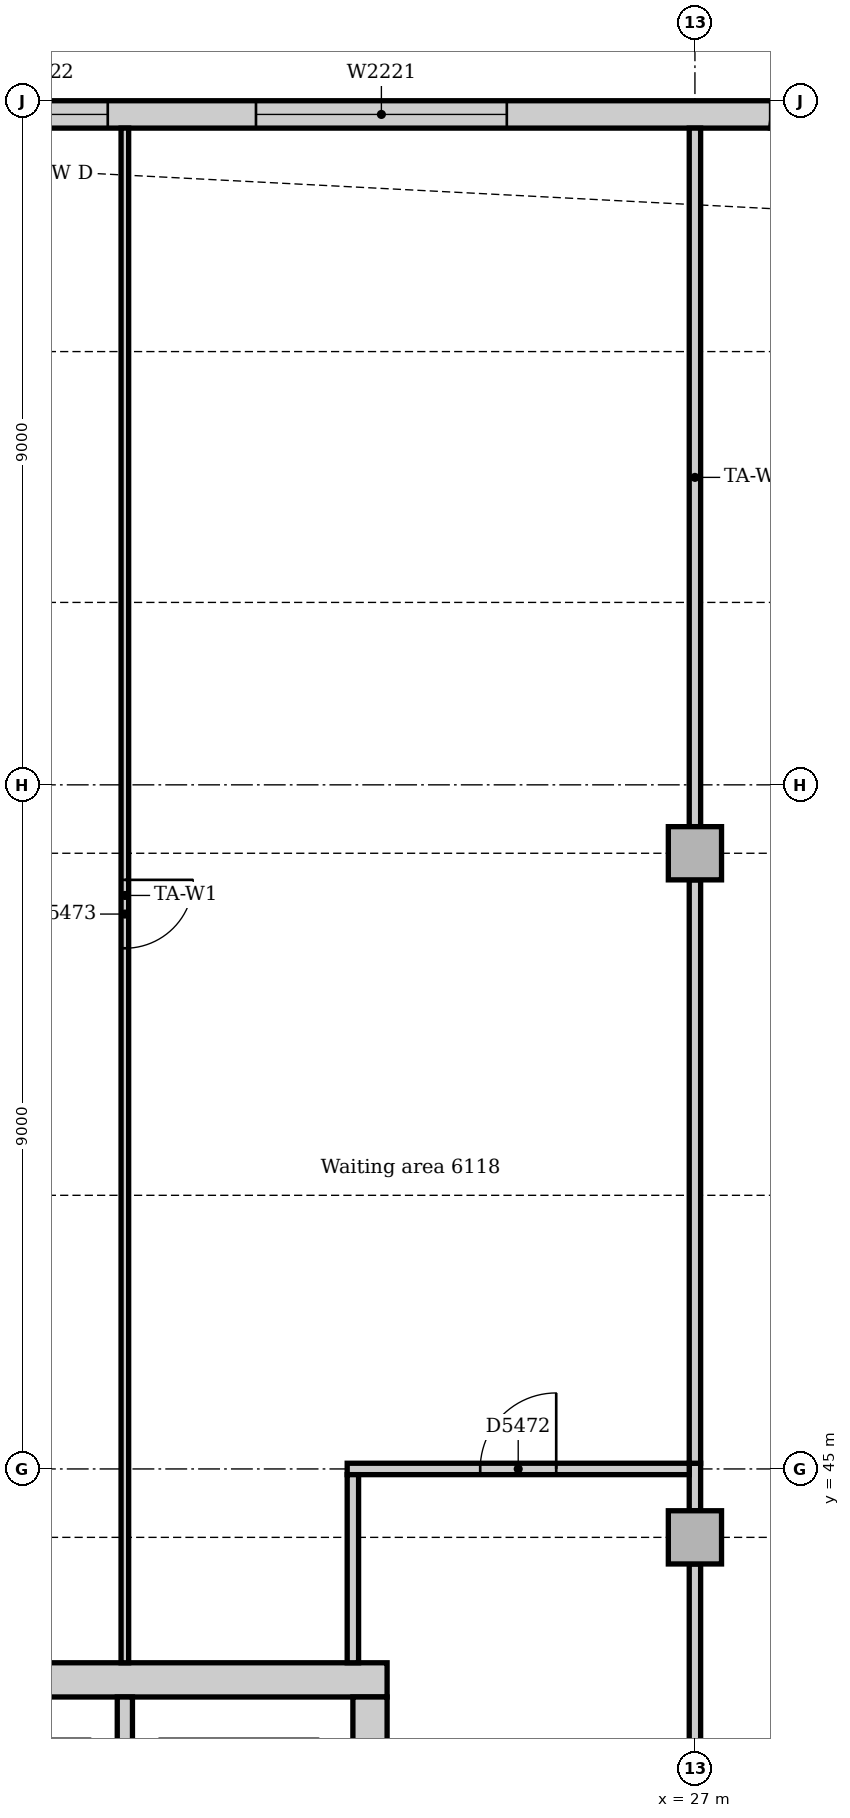
"""IFC4 building model, lengths in metres.
Left out: names, types, materials, properties, quantities, classifications, styles, units other than length and angle.
Written with IfcOpenShell. Run it as: python <this file> out.ifc"""

import sys

from ifc_helpers import new_model, si_unit, direction, frame, frame_2d, origin, origin_2d, place, context, subcontext, project, spatial, rectangle, extrude, element, fill, save


model = new_model("IFC4")
c1 = context("Model", 3, precision=1e-05, world=origin(), true_north=direction((0.0, 1.0)))
c2 = subcontext(c1, "Body", "Model", "MODEL_VIEW")
j1 = project(units=[si_unit("LENGTHUNIT", "METRE"), si_unit("PLANEANGLEUNIT", "RADIAN")], contexts=[c1])
p1 = place(None, origin())
s1 = spatial("IfcSite", under=j1, at=p1, CompositionType="ELEMENT")
p2 = place(p1, origin())
s2 = spatial("IfcBuilding", under=s1, at=p2, CompositionType="ELEMENT")
p3 = place(p2, frame((0.0, 0.0, 255.0)))
s3 = spatial("IfcBuildingStorey", under=s2, at=p3, CompositionType="ELEMENT", Elevation=255.0)
p4 = place(p3, frame((22.95, 42.225, 0.0), z_axis=(0.0, 0.0, 1.0), x_axis=(-1.0, 0.0, 0.0)))
e1 = element("IfcWall", 1, at=p4, inside=s3, PredefinedType="SOLIDWALL", context=c2, shape_type="SweptSolid", body=[
    extrude(rectangle(XDim=18.9, YDim=0.45, at=frame_2d((9.45, 0.0))), origin(), (0.0, 0.0, 1.0), 4.0),
])
p5 = place(p3, frame((22.725, 31.5, 0.0), z_axis=(0.0, 0.0, 1.0), x_axis=(0.0, 1.0, 0.0)))
e2 = element("IfcWall", 2, at=p5, inside=s3, PredefinedType="SOLIDWALL", context=c2, shape_type="SweptSolid", body=[
    extrude(rectangle(XDim=10.5, YDim=0.45, at=frame_2d((5.25, 0.0))), origin(), (0.0, 0.0, 1.0), 4.0),
])
p6 = place(p5, frame((3.15, 0.0, 0.0)))
e3 = element("IfcOpeningElement", 3, at=p6, cuts=e2, PredefinedType="OPENING", context=c2, shape_type="SweptSolid", body=[
    extrude(rectangle(XDim=1.0, YDim=2.1, at=frame_2d((0.5, 1.05))), frame((0.0, 0.235, 0.0), z_axis=(0.0, -1.0, 0.0), x_axis=(1.0, 0.0, 0.0)), (0.0, 0.0, 1.0), 0.47),
])
p7 = place(p5, frame((5.2, 0.0, 0.0)))
e4 = element("IfcOpeningElement", 4, at=p7, cuts=e2, PredefinedType="OPENING", context=c2, shape_type="SweptSolid", body=[
    extrude(rectangle(XDim=1.0, YDim=2.1, at=frame_2d((0.5, 1.05))), frame((0.0, 0.235, 0.0), z_axis=(0.0, -1.0, 0.0), x_axis=(1.0, 0.0, 0.0)), (0.0, 0.0, 1.0), 0.47),
])
for number, where, z_axis, x_axis in (
    (5, (27.0, 44.1, 0.0), (0.0, 0.0, 1.0), (1.0, 0.0, 0.0)),
    (6, (27.0, 53.1, 0.0), (0.0, 0.0, 1.0), (1.0, 0.0, 0.0)),
):
    element("IfcColumn", number, at=place(p3, frame(where, z_axis=z_axis, x_axis=x_axis)), inside=s3, PredefinedType="COLUMN", context=c2, shape_type="SweptSolid", body=[
        extrude(rectangle(XDim=0.7, YDim=0.7, at=origin_2d()), origin(), (0.0, 0.0, 1.0), 3.85),
    ])
p8 = place(p3, frame((28.007, 62.82, 0.0), z_axis=(0.0, 0.0, 1.0), x_axis=(-1.0, 0.0, 0.0)))
e7 = element("IfcWall", 7, at=p8, inside=s3, PredefinedType="STANDARD", context=c2, shape_type="SweptSolid", body=[
    extrude(rectangle(XDim=23.765, YDim=0.36, at=frame_2d((11.882, 0.0))), origin(), (0.0, 0.0, 1.0), 3.85),
])
p9 = place(p8, frame((3.482, 0.0, 0.9)))
e8 = element("IfcOpeningElement", 8, at=p9, cuts=e7, PredefinedType="OPENING", context=c2, shape_type="SweptSolid", body=[
    extrude(rectangle(XDim=3.3, YDim=1.6, at=frame_2d((1.65, 0.8))), frame((0.0, 0.19, 0.0), z_axis=(0.0, -1.0, 0.0), x_axis=(1.0, 0.0, 0.0)), (0.0, 0.0, 1.0), 0.38),
])
p10 = place(p8, frame((8.732, 0.0, 0.9)))
e9 = element("IfcOpeningElement", 9, at=p10, cuts=e7, PredefinedType="OPENING", context=c2, shape_type="SweptSolid", body=[
    extrude(rectangle(XDim=1.8, YDim=1.6, at=frame_2d((0.9, 0.8))), frame((0.0, 0.19, 0.0), z_axis=(0.0, -1.0, 0.0), x_axis=(1.0, 0.0, 0.0)), (0.0, 0.0, 1.0), 0.38),
])
p11 = place(p8, frame((12.482, 0.0, 0.9)))
e10 = element("IfcOpeningElement", 10, at=p11, cuts=e7, PredefinedType="OPENING", context=c2, shape_type="SweptSolid", body=[
    extrude(rectangle(XDim=3.3, YDim=1.6, at=frame_2d((1.65, 0.8))), frame((0.0, 0.19, 0.0), z_axis=(0.0, -1.0, 0.0), x_axis=(1.0, 0.0, 0.0)), (0.0, 0.0, 1.0), 0.38),
])
p12 = place(p8, frame((16.982, 0.0, 0.9)))
e11 = element("IfcOpeningElement", 11, at=p12, cuts=e7, PredefinedType="OPENING", context=c2, shape_type="SweptSolid", body=[
    extrude(rectangle(XDim=3.3, YDim=1.6, at=frame_2d((1.65, 0.8))), frame((0.0, 0.19, 0.0), z_axis=(0.0, -1.0, 0.0), x_axis=(1.0, 0.0, 0.0)), (0.0, 0.0, 1.0), 0.38),
])
p13 = place(p3, frame((28.726, 62.724, 0.0), z_axis=(0.0, 0.0, 1.0), x_axis=(-0.99144092581, 0.13055608231, 0.0)))
e12 = element("IfcWall", 12, at=p13, inside=s3, PredefinedType="STANDARD", context=c2, shape_type="SweptSolid", body=[
    extrude(rectangle(XDim=0.713, YDim=0.36, at=frame_2d((0.356, 0.0))), origin(), (0.0, 0.0, 1.0), 3.85),
])
p14 = place(p3, frame((19.5, 38.6, 0.0), z_axis=(0.0, 0.0, 1.0), x_axis=(0.0, 1.0, 0.0)))
e13 = element("IfcWall", 13, at=p14, inside=s3, PredefinedType="PARTITIONING", context=c2, shape_type="SweptSolid", body=[
    extrude(rectangle(XDim=3.4, YDim=0.2, at=frame_2d((1.7, 0.0))), origin(), (0.0, 0.0, 1.0), 3.85),
])
p15 = place(p3, frame((27.0, 36.35, 0.0), z_axis=(0.0, 0.0, 1.0), x_axis=(0.0, 1.0, 0.0)))
e14 = element("IfcWall", 14, at=p15, inside=s3, PredefinedType="PARTITIONING", context=c2, shape_type="SweptSolid", body=[
    extrude(rectangle(XDim=7.4, YDim=0.15, at=frame_2d((3.7, 0.0))), origin(), (0.0, 0.0, 1.0), 3.4),
])
p16 = place(p3, frame((27.0, 44.45, 0.0), z_axis=(0.0, 0.0, 1.0), x_axis=(0.0, 1.0, 0.0)))
e15 = element("IfcWall", 15, at=p16, inside=s3, PredefinedType="PARTITIONING", context=c2, shape_type="SweptSolid", body=[
    extrude(rectangle(XDim=0.625, YDim=0.15, at=frame_2d((0.312, 0.0))), origin(), (0.0, 0.0, 1.0), 3.4),
])
p17 = place(p3, frame((22.425, 45.0, 0.0), z_axis=(0.0, 0.0, 1.0), x_axis=(1.0, 0.0, 0.0)))
e16 = element("IfcWall", 16, at=p17, inside=s3, PredefinedType="PARTITIONING", context=c2, shape_type="SweptSolid", body=[
    extrude(rectangle(XDim=4.5, YDim=0.15, at=frame_2d((2.25, 0.0))), origin(), (0.0, 0.0, 1.0), 3.85),
])
p18 = place(p17, frame((1.75, 0.0, 0.0)))
e17 = element("IfcOpeningElement", 17, at=p18, cuts=e16, PredefinedType="OPENING", context=c2, shape_type="SweptSolid", body=[
    extrude(rectangle(XDim=1.0, YDim=2.1, at=frame_2d((0.5, 1.05))), frame((0.0, 0.085, 0.0), z_axis=(0.0, -1.0, 0.0), x_axis=(1.0, 0.0, 0.0)), (0.0, 0.0, 1.0), 0.17),
])
p19 = place(p3, frame((22.5, 42.45, 0.0), z_axis=(0.0, 0.0, 1.0), x_axis=(0.0, 1.0, 0.0)))
e18 = element("IfcWall", 18, at=p19, inside=s3, PredefinedType="PARTITIONING", context=c2, shape_type="SweptSolid", body=[
    extrude(rectangle(XDim=2.475, YDim=0.15, at=frame_2d((1.238, 0.0))), origin(), (0.0, 0.0, 1.0), 3.85),
])
p20 = place(p3, frame((27.0, 53.45, 0.0), z_axis=(0.0, 0.0, 1.0), x_axis=(0.0, 1.0, 0.0)))
e19 = element("IfcWall", 19, at=p20, inside=s3, PredefinedType="PARTITIONING", context=c2, shape_type="SweptSolid", body=[
    extrude(rectangle(XDim=9.19, YDim=0.15, at=frame_2d((4.595, 0.0))), origin(), (0.0, 0.0, 1.0), 3.4),
])
p21 = place(p3, frame((27.0, 45.075, 0.0), z_axis=(0.0, 0.0, 1.0), x_axis=(0.0, 1.0, 0.0)))
e20 = element("IfcWall", 20, at=p21, inside=s3, PredefinedType="PARTITIONING", context=c2, shape_type="SweptSolid", body=[
    extrude(rectangle(XDim=7.675, YDim=0.15, at=frame_2d((3.837, 0.0))), origin(), (0.0, 0.0, 1.0), 3.4),
])
p22 = place(p3, frame((19.5, 42.45, 0.0), z_axis=(0.0, 0.0, 1.0), x_axis=(0.0, 1.0, 0.0)))
e21 = element("IfcWall", 21, at=p22, inside=s3, PredefinedType="PARTITIONING", context=c2, shape_type="SweptSolid", body=[
    extrude(rectangle(XDim=20.19, YDim=0.1, at=frame_2d((10.095, 0.0))), origin(), (0.0, 0.0, 1.0), 3.85),
])
p23 = place(p22, frame((9.4, 0.0, 0.0)))
e22 = element("IfcOpeningElement", 22, at=p23, cuts=e21, PredefinedType="OPENING", context=c2, shape_type="SweptSolid", body=[
    extrude(rectangle(XDim=0.9, YDim=2.1, at=frame_2d((0.45, 1.05))), frame((0.0, 0.06, 0.0), z_axis=(0.0, -1.0, 0.0), x_axis=(1.0, 0.0, 0.0)), (0.0, 0.0, 1.0), 0.12),
])
p24 = place(p9, origin())
e23 = element("IfcWindow", 23, at=p24, inside=s3, PartitioningType="SINGLE_PANEL", PredefinedType="WINDOW", context=c2, shape_type="SweptSolid", body=[
    extrude(rectangle(XDim=3.3, YDim=1.6, at=frame_2d((1.65, 0.8))), frame((0.0, 0.13, 0.0), z_axis=(0.0, -1.0, 0.0), x_axis=(1.0, 0.0, 0.0)), (0.0, 0.0, 1.0), 0.06),
])
fill(e8, e23)
p25 = place(p10, origin())
e24 = element("IfcWindow", 24, at=p25, inside=s3, PartitioningType="SINGLE_PANEL", PredefinedType="WINDOW", context=c2, shape_type="SweptSolid", body=[
    extrude(rectangle(XDim=1.8, YDim=1.6, at=frame_2d((0.9, 0.8))), frame((0.0, 0.13, 0.0), z_axis=(0.0, -1.0, 0.0), x_axis=(1.0, 0.0, 0.0)), (0.0, 0.0, 1.0), 0.06),
])
fill(e9, e24)
p26 = place(p18, origin())
e25 = element("IfcDoor", 25, at=p26, inside=s3, OperationType="SINGLE_SWING_RIGHT", PredefinedType="DOOR", context=c2, shape_type="SweptSolid", body=[
    extrude(rectangle(XDim=1.0, YDim=2.1, at=frame_2d((0.5, 1.05))), frame((0.0, 0.025, 0.0), z_axis=(0.0, -1.0, 0.0), x_axis=(1.0, 0.0, 0.0)), (0.0, 0.0, 1.0), 0.05),
])
fill(e17, e25)
p27 = place(p23, frame((0.9, 0.0, 0.0), z_axis=(0.0, 0.0, 1.0), x_axis=(-1.0, 0.0, 0.0)))
e26 = element("IfcDoor", 26, at=p27, inside=s3, OperationType="SINGLE_SWING_LEFT", PredefinedType="DOOR", context=c2, shape_type="SweptSolid", body=[
    extrude(rectangle(XDim=0.9, YDim=2.1, at=frame_2d((0.45, 1.05))), frame((0.0, 0.025, 0.0), z_axis=(0.0, -1.0, 0.0), x_axis=(1.0, 0.0, 0.0)), (0.0, 0.0, 1.0), 0.05),
])
fill(e22, e26)
save(model, sys.argv[1])
